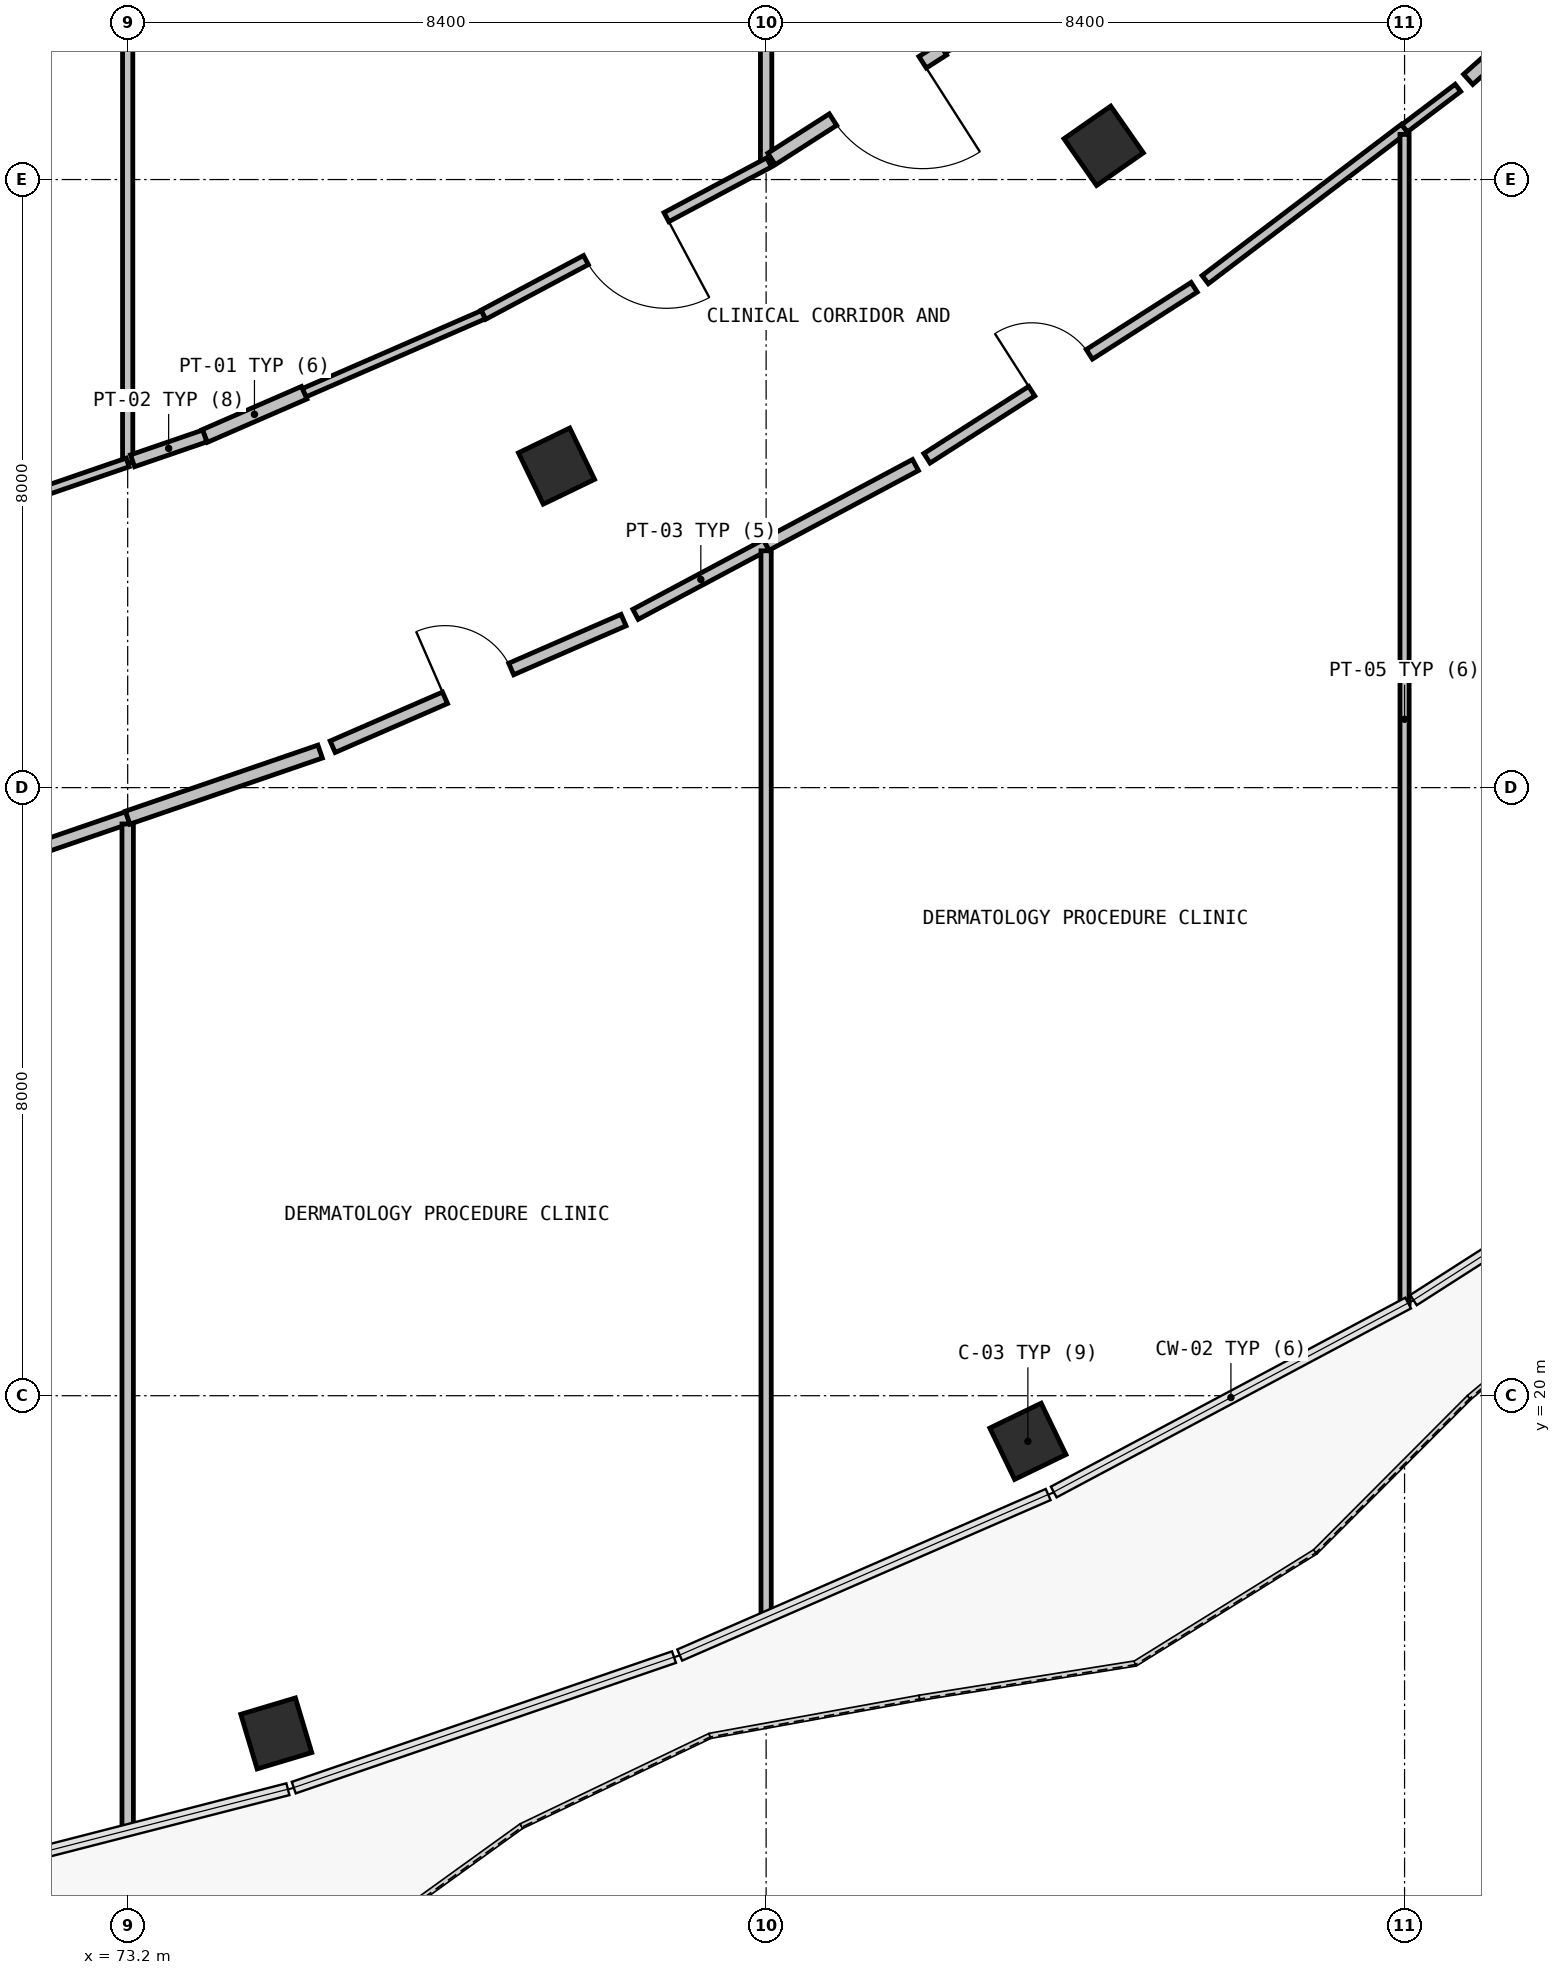
"""IFC4 building model, lengths in metres.
Left out: names, types, materials, properties, quantities, classifications, styles, units other than length and angle.
Written with IfcOpenShell. Run it as: python <this file> out.ifc"""

import sys

from ifc_helpers import new_model, si_unit, direction, frame, frame_2d, origin, origin_2d, place, context, subcontext, project, spatial, rectangle, extrude, element, fill, save


model = new_model("IFC4")
c1 = context("Model", 3, precision=1e-05, world=origin(), true_north=direction((0.0, 1.0)))
c2 = subcontext(c1, "Body", "Model", "MODEL_VIEW")
j1 = project(units=[si_unit("LENGTHUNIT", "METRE"), si_unit("PLANEANGLEUNIT", "RADIAN")], contexts=[c1])
p1 = place(None, origin())
s1 = spatial("IfcSite", under=j1, at=p1, CompositionType="ELEMENT")
p2 = place(p1, origin())
s2 = spatial("IfcBuilding", under=s1, at=p2, CompositionType="ELEMENT")
p3 = place(p2, origin())
s3 = spatial("IfcBuildingStorey", under=s2, at=p3, CompositionType="ELEMENT", Elevation=0.0)
for number, where, z_axis, x_axis in (
    (1, (75.155, 15.557, 0.0), (0.0, 0.0, 1.0), (-0.287, 0.958, 0.0)),
    (2, (78.842, 32.23, 0.0), (0.0, 0.0, 1.0), (-0.435, 0.9, 0.0)),
    (3, (85.044, 19.4, 0.0), (0.0, 0.0, 1.0), (-0.435, 0.9, 0.0)),
    (4, (86.041, 36.444, 0.0), (0.0, 0.0, 1.0), (-0.572, 0.82, 0.0)),
):
    element("IfcColumn", number, at=place(p3, frame(where, z_axis=z_axis, x_axis=x_axis)), inside=s3, PredefinedType="COLUMN", context=c2, shape_type="SweptSolid", body=[
        extrude(rectangle(XDim=0.75, YDim=0.75, at=origin_2d()), origin(), (0.0, 0.0, 1.0), 5.4),
    ])
p4 = place(p3, frame((71.784, 27.119, 0.0), z_axis=(0.0, 0.0, 1.0), x_axis=(0.945824378739, 0.324678678978, 0.0)))
e5 = element("IfcWall", 5, at=p4, inside=s3, PredefinedType="PARTITIONING", context=c2, shape_type="SweptSolid", body=[
    extrude(rectangle(XDim=1.497, YDim=0.165, at=frame_2d((0.749, 0.0))), origin(), (0.0, 0.0, 1.0), 5.08),
])
p5 = place(p3, frame((73.2, 27.522, 0.0), z_axis=(0.0, 0.0, 1.0), x_axis=(0.0, -1.0, 0.0)))
e6 = element("IfcWall", 6, at=p5, inside=s3, PredefinedType="PARTITIONING", context=c2, shape_type="SweptSolid", body=[
    extrude(rectangle(XDim=13.229, YDim=0.15, at=frame_2d((6.615, 0.0))), origin(), (0.0, 0.0, 1.0), 4.38),
])
p6 = place(p3, frame((73.2, 46.195, 0.0), z_axis=(0.0, 0.0, 1.0), x_axis=(0.0, -1.0, 0.0)))
e7 = element("IfcWall", 7, at=p6, inside=s3, PredefinedType="PARTITIONING", context=c2, shape_type="SweptSolid", body=[
    extrude(rectangle(XDim=13.917, YDim=0.135, at=frame_2d((6.958, 0.0))), origin(), (0.0, 0.0, 1.0), 5.08),
])
p7 = place(p3, frame((73.2, 32.278, 0.0), z_axis=(0.0, 0.0, 1.0), x_axis=(-0.94578196559, -0.324802206836, 0.0)))
e8 = element("IfcWall", 8, at=p7, inside=s3, PredefinedType="PARTITIONING", context=c2, shape_type="SweptSolid", body=[
    extrude(rectangle(XDim=2.926, YDim=0.12, at=frame_2d((1.463, 0.0))), origin(), (0.0, 0.0, 1.0), 5.08),
])
p8 = place(p3, frame((73.2, 27.605, 0.0), z_axis=(0.0, 0.0, 1.0), x_axis=(0.945827570445, 0.324669381042, 0.0)))
e9 = element("IfcWall", 9, at=p8, inside=s3, PredefinedType="PARTITIONING", context=c2, shape_type="SweptSolid", body=[
    extrude(rectangle(XDim=2.677, YDim=0.18, at=frame_2d((1.338, 0.0))), origin(), (0.0, 0.0, 1.0), 5.08),
])
p9 = place(p3, frame((75.897, 28.538, 0.0), z_axis=(0.0, 0.0, 1.0), x_axis=(0.916891425258, 0.399136711276, 0.0)))
e10 = element("IfcWall", 10, at=p9, inside=s3, PredefinedType="PARTITIONING", context=c2, shape_type="SweptSolid", body=[
    extrude(rectangle(XDim=4.174, YDim=0.165, at=frame_2d((2.087, 0.0))), origin(), (0.0, 0.0, 1.0), 5.08),
])
p10 = place(p9, frame((1.612, 0.0, 0.0)))
e11 = element("IfcOpeningElement", 11, at=p10, cuts=e10, PredefinedType="OPENING", context=c2, shape_type="SweptSolid", body=[
    extrude(rectangle(XDim=0.95, YDim=2.1, at=frame_2d((0.475, 1.05))), frame((0.0, 0.093, 0.0), z_axis=(0.0, -1.0, 0.0), x_axis=(1.0, 0.0, 0.0)), (0.0, 0.0, 1.0), 0.185),
])
p11 = place(p3, frame((79.882, 30.28, 0.0), z_axis=(0.0, 0.0, 1.0), x_axis=(0.882408473544, 0.470484097305, 0.0)))
e12 = element("IfcWall", 12, at=p11, inside=s3, PredefinedType="PARTITIONING", context=c2, shape_type="SweptSolid", body=[
    extrude(rectangle(XDim=1.947, YDim=0.15, at=frame_2d((0.974, 0.0))), origin(), (0.0, 0.0, 1.0), 5.08),
])
p12 = place(p3, frame((81.6, 31.116, 0.0), z_axis=(0.0, 0.0, 1.0), x_axis=(0.0, -1.0, 0.0)))
e13 = element("IfcWall", 13, at=p12, inside=s3, PredefinedType="PARTITIONING", context=c2, shape_type="SweptSolid", body=[
    extrude(rectangle(XDim=14.021, YDim=0.135, at=frame_2d((7.01, 0.0))), origin(), (0.0, 0.0, 1.0), 5.08),
])
p13 = place(p3, frame((81.6, 52.654, 0.0), z_axis=(0.0, 0.0, 1.0), x_axis=(0.0, -1.0, 0.0)))
e14 = element("IfcWall", 14, at=p13, inside=s3, PredefinedType="PARTITIONING", context=c2, shape_type="SweptSolid", body=[
    extrude(rectangle(XDim=16.428, YDim=0.15, at=frame_2d((8.214, 0.0))), origin(), (0.0, 0.0, 1.0), 5.08),
])
p14 = place(p3, frame((81.639, 36.226, 0.0), z_axis=(0.0, 0.0, 1.0), x_axis=(-0.882373557975, -0.470549576758, 0.0)))
e15 = element("IfcWall", 15, at=p14, inside=s3, PredefinedType="PARTITIONING", context=c2, shape_type="SweptSolid", body=[
    extrude(rectangle(XDim=4.261, YDim=0.135, at=frame_2d((2.131, 0.0))), origin(), (0.0, 0.0, 1.0), 5.08),
])
p15 = place(p14, frame((1.531, 0.0, 0.0)))
e16 = element("IfcOpeningElement", 16, at=p15, cuts=e15, PredefinedType="OPENING", context=c2, shape_type="SweptSolid", body=[
    extrude(rectangle(XDim=1.2, YDim=2.15, at=frame_2d((0.6, 1.075))), frame((0.0, 0.077, 0.0), z_axis=(0.0, -1.0, 0.0), x_axis=(1.0, 0.0, 0.0)), (0.0, 0.0, 1.0), 0.155),
])
p16 = place(p3, frame((77.879, 34.221, 0.0), z_axis=(0.0, 0.0, 1.0), x_axis=(-0.916909925392, -0.399094210327, 0.0)))
e17 = element("IfcWall", 17, at=p16, inside=s3, PredefinedType="PARTITIONING", context=c2, shape_type="SweptSolid", body=[
    extrude(rectangle(XDim=2.571, YDim=0.12, at=frame_2d((1.285, 0.0))), origin(), (0.0, 0.0, 1.0), 5.08),
])
p17 = place(p3, frame((75.522, 33.195, 0.0), z_axis=(0.0, 0.0, 1.0), x_axis=(-0.916953001302, -0.398995229799, 0.0)))
e18 = element("IfcWall", 18, at=p17, inside=s3, PredefinedType="PARTITIONING", context=c2, shape_type="SweptSolid", body=[
    extrude(rectangle(XDim=1.426, YDim=0.18, at=frame_2d((0.713, 0.0))), origin(), (0.0, 0.0, 1.0), 5.08),
])
p18 = place(p3, frame((74.214, 32.626, 0.0), z_axis=(0.0, 0.0, 1.0), x_axis=(-0.945901199619, -0.324454805111, 0.0)))
e19 = element("IfcWall", 19, at=p18, inside=s3, PredefinedType="PARTITIONING", context=c2, shape_type="SweptSolid", body=[
    extrude(rectangle(XDim=1.005, YDim=0.165, at=frame_2d((0.502, 0.0))), origin(), (0.0, 0.0, 1.0), 5.08),
])
p19 = place(p3, frame((81.6, 31.196, 0.0), z_axis=(0.0, 0.0, 1.0), x_axis=(0.882365080709, 0.470565472963, 0.0)))
e20 = element("IfcWall", 20, at=p19, inside=s3, PredefinedType="PARTITIONING", context=c2, shape_type="SweptSolid", body=[
    extrude(rectangle(XDim=2.227, YDim=0.165, at=frame_2d((1.113, 0.0))), origin(), (0.0, 0.0, 1.0), 5.08),
])
p20 = place(p3, frame((83.716, 32.333, 0.0), z_axis=(0.0, 0.0, 1.0), x_axis=(0.842288395676, 0.539027140792, 0.0)))
e21 = element("IfcWall", 21, at=p20, inside=s3, PredefinedType="PARTITIONING", context=c2, shape_type="SweptSolid", body=[
    extrude(rectangle(XDim=4.174, YDim=0.15, at=frame_2d((2.087, 0.0))), origin(), (0.0, 0.0, 1.0), 5.08),
])
p21 = place(p20, frame((1.637, 0.0, 0.0)))
e22 = element("IfcOpeningElement", 22, at=p21, cuts=e21, PredefinedType="OPENING", context=c2, shape_type="SweptSolid", body=[
    extrude(rectangle(XDim=0.9, YDim=2.1, at=frame_2d((0.45, 1.05))), frame((0.0, 0.085, 0.0), z_axis=(0.0, -1.0, 0.0), x_axis=(1.0, 0.0, 0.0)), (0.0, 0.0, 1.0), 0.17),
])
p22 = place(p3, frame((87.377, 34.683, 0.0), z_axis=(0.0, 0.0, 1.0), x_axis=(0.796534911727, 0.604592535846, 0.0)))
e23 = element("IfcWall", 23, at=p22, inside=s3, PredefinedType="PARTITIONING", context=c2, shape_type="SweptSolid", body=[
    extrude(rectangle(XDim=3.293, YDim=0.135, at=frame_2d((1.646, 0.0))), origin(), (0.0, 0.0, 1.0), 5.08),
])
p23 = place(p3, frame((90.0, 36.594, 0.0), z_axis=(0.0, 0.0, 1.0), x_axis=(0.0, -1.0, 0.0)))
e24 = element("IfcWall", 24, at=p23, inside=s3, PredefinedType="PARTITIONING", context=c2, shape_type="SweptSolid", body=[
    extrude(rectangle(XDim=15.388, YDim=0.12, at=frame_2d((7.694, 0.0))), origin(), (0.0, 0.0, 1.0), 5.08),
])
p24 = place(p3, frame((84.775, 38.258, 0.0), z_axis=(0.0, 0.0, 1.0), x_axis=(-0.841972219497, -0.539520881519, 0.0)))
e25 = element("IfcWall", 25, at=p24, inside=s3, PredefinedType="PARTITIONING", context=c2, shape_type="SweptSolid", body=[
    extrude(rectangle(XDim=1.008, YDim=0.12, at=frame_2d((0.504, 0.0))), origin(), (0.0, 0.0, 1.0), 5.08),
])
p25 = place(p3, frame((83.926, 37.714, 0.0), z_axis=(0.0, 0.0, 1.0), x_axis=(-0.842299552768, -0.539009706226, 0.0)))
e26 = element("IfcWall", 26, at=p25, inside=s3, PredefinedType="PARTITIONING", context=c2, shape_type="SweptSolid", body=[
    extrude(rectangle(XDim=2.677, YDim=0.18, at=frame_2d((1.339, 0.0))), origin(), (0.0, 0.0, 1.0), 5.08),
])
p26 = place(p25, frame((0.317, 0.0, 0.0)))
e27 = element("IfcOpeningElement", 27, at=p26, cuts=e26, PredefinedType="OPENING", context=c2, shape_type="SweptSolid", body=[
    extrude(rectangle(XDim=1.4, YDim=2.15, at=frame_2d((0.7, 1.075))), frame((0.0, 0.1, 0.0), z_axis=(0.0, -1.0, 0.0), x_axis=(1.0, 0.0, 0.0)), (0.0, 0.0, 1.0), 0.2),
])
p27 = place(p3, frame((90.0, 36.674, 0.0), z_axis=(0.0, 0.0, 1.0), x_axis=(0.796962746225, 0.60402846053, 0.0)))
e28 = element("IfcWall", 28, at=p27, inside=s3, PredefinedType="PARTITIONING", context=c2, shape_type="SweptSolid", body=[
    extrude(rectangle(XDim=0.881, YDim=0.12, at=frame_2d((0.44, 0.0))), origin(), (0.0, 0.0, 1.0), 5.08),
])
p28 = place(p3, frame((90.837, 37.318, 0.0), z_axis=(0.0, 0.0, 1.0), x_axis=(0.746227117169, 0.66569143723, 0.0)))
e29 = element("IfcWall", 29, at=p28, inside=s3, PredefinedType="PARTITIONING", context=c2, shape_type="SweptSolid", body=[
    extrude(rectangle(XDim=4.174, YDim=0.18, at=frame_2d((2.087, 0.0))), origin(), (0.0, 0.0, 1.0), 5.08),
])
p29 = place(p10, origin())
e30 = element("IfcDoor", 30, at=p29, inside=s3, OperationType="SINGLE_SWING_RIGHT", PredefinedType="DOOR", context=c2, shape_type="SweptSolid", body=[
    extrude(rectangle(XDim=0.95, YDim=2.1, at=frame_2d((0.475, 1.05))), frame((0.0, 0.025, 0.0), z_axis=(0.0, -1.0, 0.0), x_axis=(1.0, 0.0, 0.0)), (0.0, 0.0, 1.0), 0.05),
])
fill(e11, e30)
p30 = place(p15, origin())
e31 = element("IfcDoor", 31, at=p30, inside=s3, OperationType="SINGLE_SWING_LEFT", PredefinedType="DOOR", context=c2, shape_type="SweptSolid", body=[
    extrude(rectangle(XDim=1.2, YDim=2.15, at=frame_2d((0.6, 1.075))), frame((0.0, 0.025, 0.0), z_axis=(0.0, -1.0, 0.0), x_axis=(1.0, 0.0, 0.0)), (0.0, 0.0, 1.0), 0.05),
])
fill(e16, e31)
p31 = place(p21, origin())
e32 = element("IfcDoor", 32, at=p31, inside=s3, OperationType="SINGLE_SWING_LEFT", PredefinedType="DOOR", context=c2, shape_type="SweptSolid", body=[
    extrude(rectangle(XDim=0.9, YDim=2.1, at=frame_2d((0.45, 1.05))), frame((0.0, 0.025, 0.0), z_axis=(0.0, -1.0, 0.0), x_axis=(1.0, 0.0, 0.0)), (0.0, 0.0, 1.0), 0.05),
])
fill(e22, e32)
p32 = place(p26, origin())
e33 = element("IfcDoor", 33, at=p32, inside=s3, OperationType="SINGLE_SWING_RIGHT", PredefinedType="DOOR", context=c2, shape_type="SweptSolid", body=[
    extrude(rectangle(XDim=1.4, YDim=2.15, at=frame_2d((0.7, 1.075))), frame((0.0, 0.025, 0.0), z_axis=(0.0, -1.0, 0.0), x_axis=(1.0, 0.0, 0.0)), (0.0, 0.0, 1.0), 0.05),
])
fill(e27, e33)
save(model, sys.argv[1])
